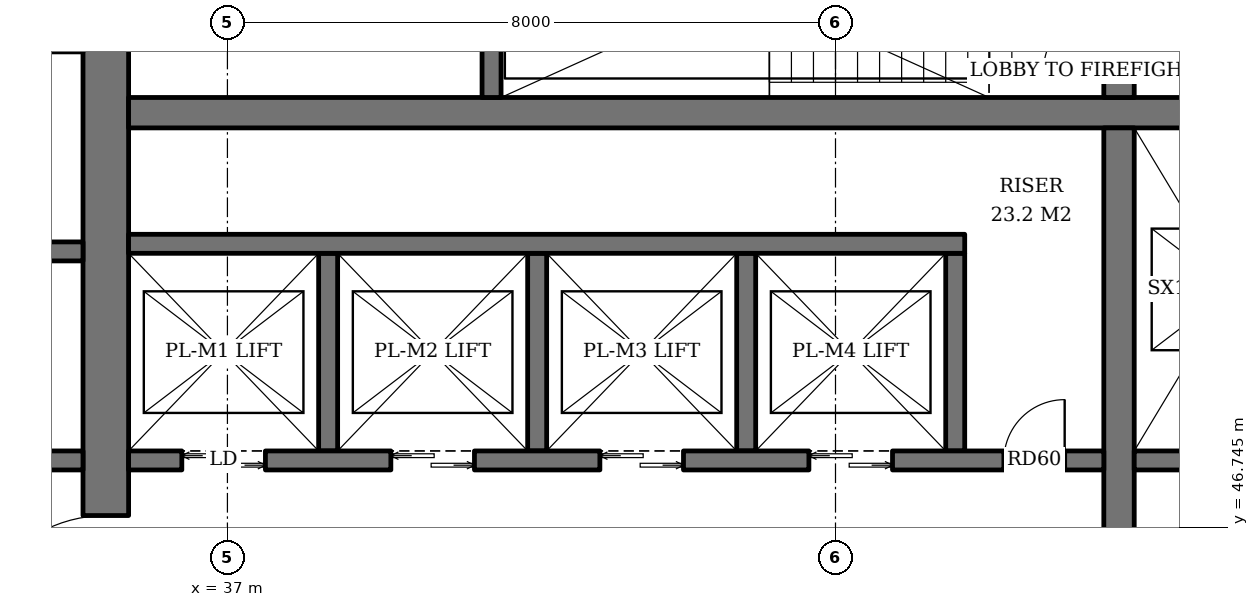
"""IFC4 building model, lengths in metres.
Left out: names, types, materials, properties, quantities, classifications, styles, units other than length and angle.
Written with IfcOpenShell. Run it as: python <this file> out.ifc"""

import sys

from ifc_helpers import new_model, si_unit, direction, frame, frame_2d, origin, place, context, subcontext, project, spatial, rectangle, extrude, element, fill, save


model = new_model("IFC4")
c1 = context("Model", 3, precision=1e-05, world=origin(), true_north=direction((0.0, 1.0)))
c2 = subcontext(c1, "Body", "Model", "MODEL_VIEW")
j1 = project(units=[si_unit("LENGTHUNIT", "METRE"), si_unit("PLANEANGLEUNIT", "RADIAN")], contexts=[c1])
p1 = place(None, origin())
s1 = spatial("IfcSite", under=j1, at=p1, CompositionType="ELEMENT")
p2 = place(p1, origin())
s2 = spatial("IfcBuilding", under=s1, at=p2, CompositionType="ELEMENT")
p3 = place(p2, frame((0.0, 0.0, 123.6)))
s3 = spatial("IfcBuildingStorey", under=s2, at=p3, CompositionType="ELEMENT", Elevation=123.6)
p4 = place(p3, frame((35.4, 36.7, 0.0), z_axis=(0.0, 0.0, 1.0), x_axis=(0.0, 1.0, 0.0)))
e1 = element("IfcWall", 1, at=p4, inside=s3, PredefinedType="SHEAR", context=c2, shape_type="SweptSolid", body=[
    extrude(rectangle(XDim=18.6, YDim=0.6, at=frame_2d((9.3, 0.0))), origin(), (0.0, 0.0, 1.0), 3.8),
])
p5 = place(p4, frame((8.4, 0.0, 0.0)))
e2 = element("IfcOpeningElement", 2, at=p5, cuts=e1, PredefinedType="OPENING", context=c2, shape_type="SweptSolid", body=[
    extrude(rectangle(XDim=1.8, YDim=2.4, at=frame_2d((0.9, 1.2))), frame((0.0, 0.31, 0.0), z_axis=(0.0, -1.0, 0.0), x_axis=(1.0, 0.0, 0.0)), (0.0, 0.0, 1.0), 0.62),
])
p6 = place(p3, frame((35.7, 52.2, 0.0), z_axis=(0.0, 0.0, 1.0), x_axis=(1.0, 0.0, 0.0)))
e3 = element("IfcWall", 3, at=p6, inside=s3, PredefinedType="SHEAR", context=c2, shape_type="SweptSolid", body=[
    extrude(rectangle(XDim=18.6, YDim=0.4, at=frame_2d((9.3, 0.0))), origin(), (0.0, 0.0, 1.0), 3.8),
])
p7 = place(p3, frame((48.73, 40.0, 0.0), z_axis=(0.0, 0.0, 1.0), x_axis=(0.0, 1.0, 0.0)))
e4 = element("IfcWall", 4, at=p7, inside=s3, PredefinedType="SHEAR", context=c2, shape_type="SweptSolid", body=[
    extrude(rectangle(XDim=12.0, YDim=0.4, at=frame_2d((6.0, 0.0))), origin(), (0.0, 0.0, 1.0), 3.8),
])
p8 = place(p3, frame((48.73, 52.4, 0.0), z_axis=(0.0, 0.0, 1.0), x_axis=(0.0, 1.0, 0.0)))
e5 = element("IfcWall", 5, at=p8, inside=s3, PredefinedType="SHEAR", context=c2, shape_type="SweptSolid", body=[
    extrude(rectangle(XDim=2.9, YDim=0.4, at=frame_2d((1.45, 0.0))), origin(), (0.0, 0.0, 1.0), 3.8),
])
p9 = place(p8, frame((0.3, 0.0, 0.0)))
e6 = element("IfcOpeningElement", 6, at=p9, cuts=e5, PredefinedType="OPENING", context=c2, shape_type="SweptSolid", body=[
    extrude(rectangle(XDim=1.0, YDim=2.1, at=frame_2d((0.5, 1.05))), frame((0.0, 0.21, 0.0), z_axis=(0.0, -1.0, 0.0), x_axis=(1.0, 0.0, 0.0)), (0.0, 0.0, 1.0), 0.42),
])
p10 = place(p3, frame((40.475, 52.4, 0.0), z_axis=(0.0, 0.0, 1.0), x_axis=(0.0, 1.0, 0.0)))
e7 = element("IfcWall", 7, at=p10, inside=s3, PredefinedType="SHEAR", context=c2, shape_type="SweptSolid", body=[
    extrude(rectangle(XDim=2.9, YDim=0.25, at=frame_2d((1.45, 0.0))), origin(), (0.0, 0.0, 1.0), 3.8),
])
for number, where, z_axis, x_axis in (
    (8, (38.325, 47.75, 0.0), (0.0, 0.0, 1.0), (0.0, 1.0, 0.0)),
    (9, (41.075, 47.75, 0.0), (0.0, 0.0, 1.0), (0.0, 1.0, 0.0)),
    (10, (43.825, 47.75, 0.0), (0.0, 0.0, 1.0), (0.0, 1.0, 0.0)),
    (11, (46.575, 47.75, 0.0), (0.0, 0.0, 1.0), (0.0, 1.0, 0.0)),
):
    element("IfcWall", number, at=place(p3, frame(where, z_axis=z_axis, x_axis=x_axis)), inside=s3, PredefinedType="SHEAR", context=c2, shape_type="SweptSolid", body=[
        extrude(rectangle(XDim=2.6, YDim=0.25, at=frame_2d((1.3, 0.0))), origin(), (0.0, 0.0, 1.0), 3.8),
    ])
p11 = place(p3, frame((35.7, 50.475, 0.0), z_axis=(0.0, 0.0, 1.0), x_axis=(1.0, 0.0, 0.0)))
e12 = element("IfcWall", 12, at=p11, inside=s3, PredefinedType="SHEAR", context=c2, shape_type="SweptSolid", body=[
    extrude(rectangle(XDim=11.0, YDim=0.25, at=frame_2d((5.5, 0.0))), origin(), (0.0, 0.0, 1.0), 3.8),
])
p12 = place(p3, frame((35.7, 47.625, 0.0), z_axis=(0.0, 0.0, 1.0), x_axis=(1.0, 0.0, 0.0)))
e13 = element("IfcWall", 13, at=p12, inside=s3, PredefinedType="SHEAR", context=c2, shape_type="SweptSolid", body=[
    extrude(rectangle(XDim=12.83, YDim=0.25, at=frame_2d((6.415, 0.0))), origin(), (0.0, 0.0, 1.0), 3.8),
])
p13 = place(p12, frame((0.7, 0.0, 0.0)))
e14 = element("IfcOpeningElement", 14, at=p13, cuts=e13, PredefinedType="OPENING", context=c2, shape_type="SweptSolid", body=[
    extrude(rectangle(XDim=1.1, YDim=2.2, at=frame_2d((0.55, 1.1))), frame((0.0, 0.135, 0.0), z_axis=(0.0, -1.0, 0.0), x_axis=(1.0, 0.0, 0.0)), (0.0, 0.0, 1.0), 0.27),
])
p14 = place(p12, frame((3.45, 0.0, 0.0)))
e15 = element("IfcOpeningElement", 15, at=p14, cuts=e13, PredefinedType="OPENING", context=c2, shape_type="SweptSolid", body=[
    extrude(rectangle(XDim=1.1, YDim=2.2, at=frame_2d((0.55, 1.1))), frame((0.0, 0.135, 0.0), z_axis=(0.0, -1.0, 0.0), x_axis=(1.0, 0.0, 0.0)), (0.0, 0.0, 1.0), 0.27),
])
p15 = place(p12, frame((6.2, 0.0, 0.0)))
e16 = element("IfcOpeningElement", 16, at=p15, cuts=e13, PredefinedType="OPENING", context=c2, shape_type="SweptSolid", body=[
    extrude(rectangle(XDim=1.1, YDim=2.2, at=frame_2d((0.55, 1.1))), frame((0.0, 0.135, 0.0), z_axis=(0.0, -1.0, 0.0), x_axis=(1.0, 0.0, 0.0)), (0.0, 0.0, 1.0), 0.27),
])
p16 = place(p12, frame((8.95, 0.0, 0.0)))
e17 = element("IfcOpeningElement", 17, at=p16, cuts=e13, PredefinedType="OPENING", context=c2, shape_type="SweptSolid", body=[
    extrude(rectangle(XDim=1.1, YDim=2.2, at=frame_2d((0.55, 1.1))), frame((0.0, 0.135, 0.0), z_axis=(0.0, -1.0, 0.0), x_axis=(1.0, 0.0, 0.0)), (0.0, 0.0, 1.0), 0.27),
])
p17 = place(p12, frame((11.515, 0.0, 0.0)))
e18 = element("IfcOpeningElement", 18, at=p17, cuts=e13, PredefinedType="OPENING", context=c2, shape_type="SweptSolid", body=[
    extrude(rectangle(XDim=0.8, YDim=2.0, at=frame_2d((0.4, 1.0))), frame((0.0, 0.135, 0.0), z_axis=(0.0, -1.0, 0.0), x_axis=(1.0, 0.0, 0.0)), (0.0, 0.0, 1.0), 0.27),
])
p18 = place(p3, frame((48.93, 47.625, 0.0), z_axis=(0.0, 0.0, 1.0), x_axis=(1.0, 0.0, 0.0)))
e19 = element("IfcWall", 19, at=p18, inside=s3, PredefinedType="SHEAR", context=c2, shape_type="SweptSolid", body=[
    extrude(rectangle(XDim=5.37, YDim=0.25, at=frame_2d((2.685, 0.0))), origin(), (0.0, 0.0, 1.0), 3.8),
])
for number, where, z_axis, x_axis in (
    (20, (32.4, 47.625, 0.0), (0.0, 0.0, 1.0), (1.0, 0.0, 0.0)),
    (21, (32.4, 50.375, 0.0), (0.0, 0.0, 1.0), (1.0, 0.0, 0.0)),
):
    element("IfcWall", number, at=place(p3, frame(where, z_axis=z_axis, x_axis=x_axis)), inside=s3, PredefinedType="SHEAR", context=c2, shape_type="SweptSolid", body=[
        extrude(rectangle(XDim=2.7, YDim=0.25, at=frame_2d((1.35, 0.0))), origin(), (0.0, 0.0, 1.0), 3.8),
    ])
p19 = place(p13, origin())
e22 = element("IfcDoor", 22, at=p19, inside=s3, OperationType="DOUBLE_DOOR_SLIDING", PredefinedType="DOOR", context=c2, shape_type="SweptSolid", body=[
    extrude(rectangle(XDim=1.1, YDim=2.2, at=frame_2d((0.55, 1.1))), frame((0.0, 0.025, 0.0), z_axis=(0.0, -1.0, 0.0), x_axis=(1.0, 0.0, 0.0)), (0.0, 0.0, 1.0), 0.05),
])
fill(e14, e22)
p20 = place(p14, origin())
e23 = element("IfcDoor", 23, at=p20, inside=s3, OperationType="DOUBLE_DOOR_SLIDING", PredefinedType="DOOR", context=c2, shape_type="SweptSolid", body=[
    extrude(rectangle(XDim=1.1, YDim=2.2, at=frame_2d((0.55, 1.1))), frame((0.0, 0.025, 0.0), z_axis=(0.0, -1.0, 0.0), x_axis=(1.0, 0.0, 0.0)), (0.0, 0.0, 1.0), 0.05),
])
fill(e15, e23)
p21 = place(p15, origin())
e24 = element("IfcDoor", 24, at=p21, inside=s3, OperationType="DOUBLE_DOOR_SLIDING", PredefinedType="DOOR", context=c2, shape_type="SweptSolid", body=[
    extrude(rectangle(XDim=1.1, YDim=2.2, at=frame_2d((0.55, 1.1))), frame((0.0, 0.025, 0.0), z_axis=(0.0, -1.0, 0.0), x_axis=(1.0, 0.0, 0.0)), (0.0, 0.0, 1.0), 0.05),
])
fill(e16, e24)
p22 = place(p16, origin())
e25 = element("IfcDoor", 25, at=p22, inside=s3, OperationType="DOUBLE_DOOR_SLIDING", PredefinedType="DOOR", context=c2, shape_type="SweptSolid", body=[
    extrude(rectangle(XDim=1.1, YDim=2.2, at=frame_2d((0.55, 1.1))), frame((0.0, 0.025, 0.0), z_axis=(0.0, -1.0, 0.0), x_axis=(1.0, 0.0, 0.0)), (0.0, 0.0, 1.0), 0.05),
])
fill(e17, e25)
p23 = place(p17, origin())
e26 = element("IfcDoor", 26, at=p23, inside=s3, OperationType="SINGLE_SWING_RIGHT", PredefinedType="DOOR", context=c2, shape_type="SweptSolid", body=[
    extrude(rectangle(XDim=0.8, YDim=2.0, at=frame_2d((0.4, 1.0))), frame((0.0, 0.025, 0.0), z_axis=(0.0, -1.0, 0.0), x_axis=(1.0, 0.0, 0.0)), (0.0, 0.0, 1.0), 0.05),
])
fill(e18, e26)
p24 = place(p9, origin())
e27 = element("IfcDoor", 27, at=p24, inside=s3, OperationType="SINGLE_SWING_LEFT", PredefinedType="DOOR", context=c2, shape_type="SweptSolid", body=[
    extrude(rectangle(XDim=1.0, YDim=2.1, at=frame_2d((0.5, 1.05))), frame((0.0, 0.025, 0.0), z_axis=(0.0, -1.0, 0.0), x_axis=(1.0, 0.0, 0.0)), (0.0, 0.0, 1.0), 0.05),
])
fill(e6, e27)
p25 = place(p5, origin())
e28 = element("IfcDoor", 28, at=p25, inside=s3, OperationType="DOUBLE_DOOR_SINGLE_SWING", PredefinedType="DOOR", context=c2, shape_type="SweptSolid", body=[
    extrude(rectangle(XDim=1.8, YDim=2.4, at=frame_2d((0.9, 1.2))), frame((0.0, 0.025, 0.0), z_axis=(0.0, -1.0, 0.0), x_axis=(1.0, 0.0, 0.0)), (0.0, 0.0, 1.0), 0.05),
])
fill(e2, e28)
save(model, sys.argv[1])
